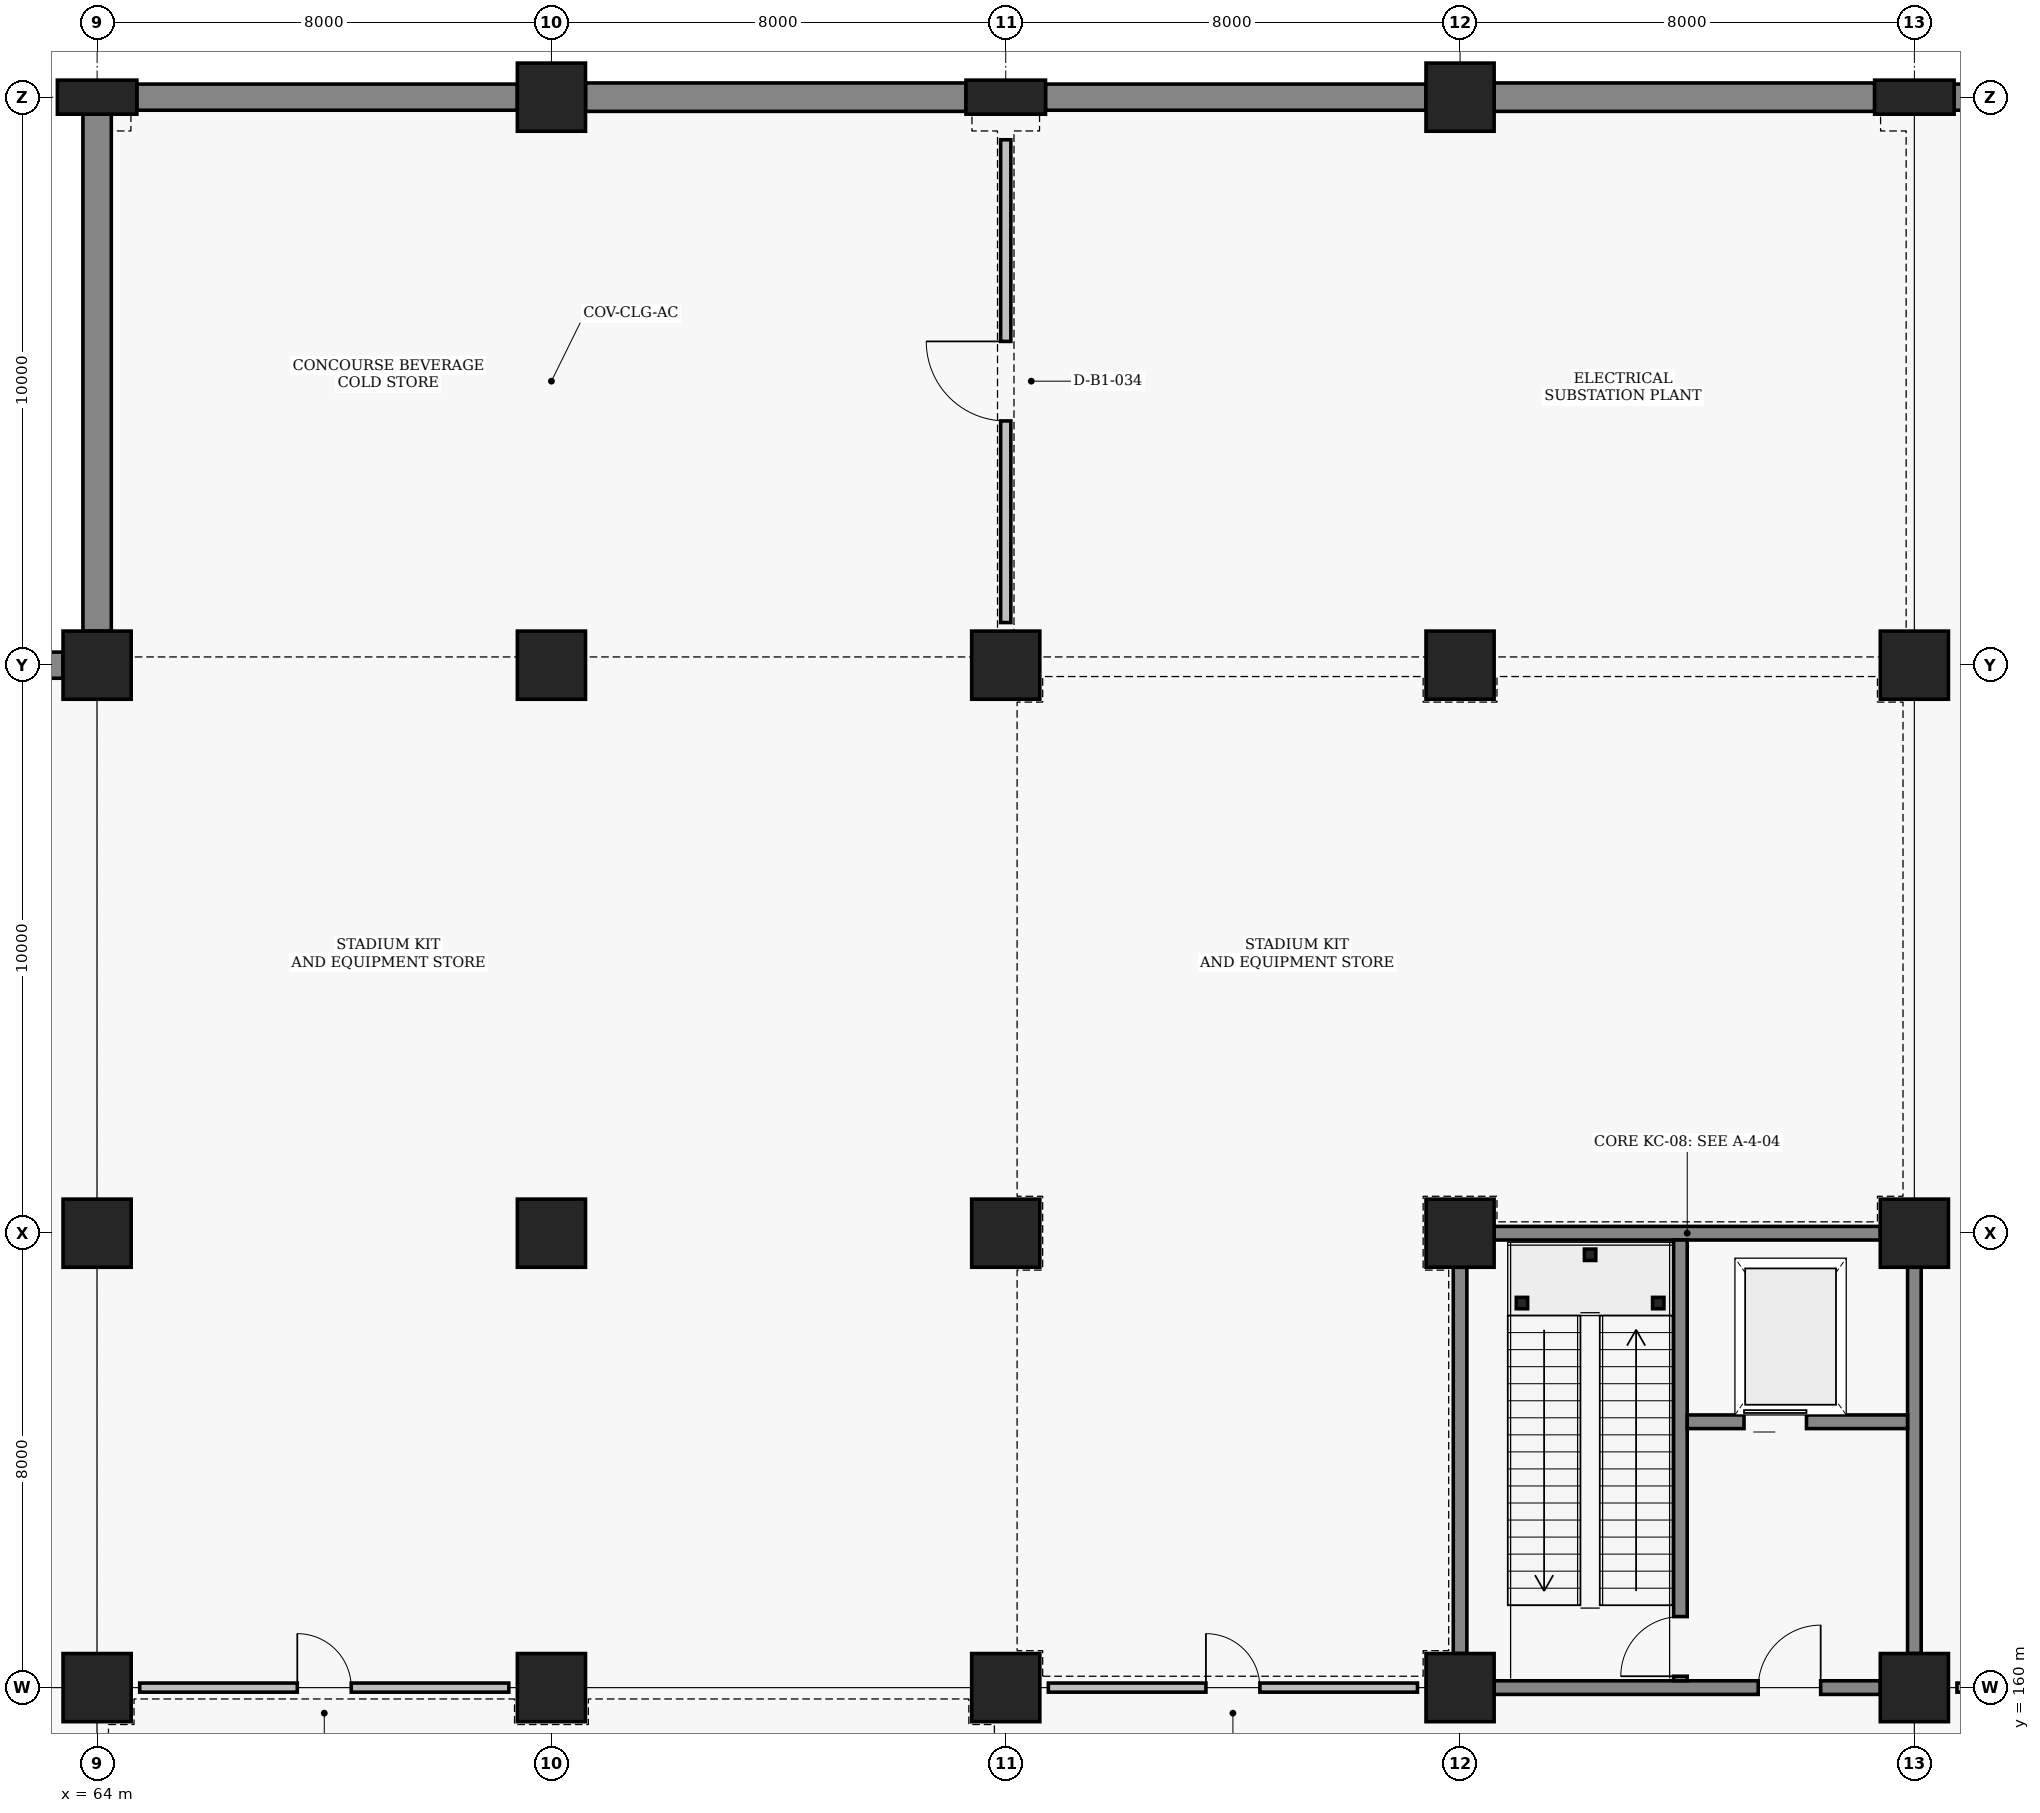
"""IFC4 building model, lengths in metres.
Left out: names, types, materials, properties, quantities, classifications, styles, units other than length and angle.
Written with IfcOpenShell. Run it as: python <this file> out.ifc"""

import sys

from ifc_helpers import new_model, si_unit, direction, frame, frame_2d, origin, origin_2d, place, context, subcontext, project, spatial, rectangle, hollow_rectangle, extrude, element, fill, save


model = new_model("IFC4")
c1 = context("Model", 3, precision=1e-05, world=origin(), true_north=direction((0.0, 1.0)))
c2 = subcontext(c1, "Body", "Model", "MODEL_VIEW")
j1 = project(units=[si_unit("LENGTHUNIT", "METRE"), si_unit("PLANEANGLEUNIT", "RADIAN")], contexts=[c1])
p1 = place(None, origin())
s1 = spatial("IfcSite", under=j1, at=p1, CompositionType="ELEMENT")
p2 = place(p1, origin())
s2 = spatial("IfcBuilding", under=s1, at=p2, CompositionType="ELEMENT")
p3 = place(p2, frame((0.0, 0.0, -5.4)))
s3 = spatial("IfcBuildingStorey", under=s2, at=p3, CompositionType="ELEMENT", Elevation=-5.4)
for number, where, z_axis, x_axis in (
    (1, (64.0, 160.0, 0.0), (0.0, 0.0, 1.0), (1.0, 0.0, 0.0)),
    (2, (64.0, 168.0, 0.0), (0.0, 0.0, 1.0), (1.0, 0.0, 0.0)),
    (3, (64.0, 178.0, 0.0), (0.0, 0.0, 1.0), (1.0, 0.0, 0.0)),
):
    element("IfcColumn", number, at=place(p3, frame(where, z_axis=z_axis, x_axis=x_axis)), inside=s3, PredefinedType="COLUMN", context=c2, shape_type="SweptSolid", body=[
        extrude(rectangle(XDim=1.2, YDim=1.2, at=origin_2d()), origin(), (0.0, 0.0, 1.0), 5.4),
    ])
p4 = place(p3, frame((64.0, 188.0, 0.0), z_axis=(0.0, 0.0, 1.0), x_axis=(0.0, 1.0, 0.0)))
e4 = element("IfcColumn", 4, at=p4, inside=s3, PredefinedType="PILASTER", context=c2, shape_type="SweptSolid", body=[
    extrude(rectangle(XDim=0.6, YDim=1.4, at=origin_2d()), origin(), (0.0, 0.0, 1.0), 5.4),
])
for number, where, z_axis, x_axis in (
    (5, (72.0, 160.0, 0.0), (0.0, 0.0, 1.0), (1.0, 0.0, 0.0)),
    (6, (72.0, 168.0, 0.0), (0.0, 0.0, 1.0), (1.0, 0.0, 0.0)),
    (7, (72.0, 178.0, 0.0), (0.0, 0.0, 1.0), (1.0, 0.0, 0.0)),
    (8, (72.0, 188.0, 0.0), (0.0, 0.0, 1.0), (1.0, 0.0, 0.0)),
    (9, (80.0, 160.0, 0.0), (0.0, 0.0, 1.0), (1.0, 0.0, 0.0)),
    (10, (80.0, 168.0, 0.0), (0.0, 0.0, 1.0), (1.0, 0.0, 0.0)),
    (11, (80.0, 178.0, 0.0), (0.0, 0.0, 1.0), (1.0, 0.0, 0.0)),
):
    element("IfcColumn", number, at=place(p3, frame(where, z_axis=z_axis, x_axis=x_axis)), inside=s3, PredefinedType="COLUMN", context=c2, shape_type="SweptSolid", body=[
        extrude(rectangle(XDim=1.2, YDim=1.2, at=origin_2d()), origin(), (0.0, 0.0, 1.0), 5.4),
    ])
p5 = place(p3, frame((80.0, 188.0, 0.0), z_axis=(0.0, 0.0, 1.0), x_axis=(0.0, 1.0, 0.0)))
e12 = element("IfcColumn", 12, at=p5, inside=s3, PredefinedType="PILASTER", context=c2, shape_type="SweptSolid", body=[
    extrude(rectangle(XDim=0.6, YDim=1.4, at=origin_2d()), origin(), (0.0, 0.0, 1.0), 5.4),
])
for number, where, z_axis, x_axis in (
    (13, (88.0, 160.0, 0.0), (0.0, 0.0, 1.0), (1.0, 0.0, 0.0)),
    (14, (88.0, 168.0, 0.0), (0.0, 0.0, 1.0), (1.0, 0.0, 0.0)),
    (15, (88.0, 178.0, 0.0), (0.0, 0.0, 1.0), (1.0, 0.0, 0.0)),
    (16, (88.0, 188.0, 0.0), (0.0, 0.0, 1.0), (1.0, 0.0, 0.0)),
    (17, (96.0, 160.0, 0.0), (0.0, 0.0, 1.0), (1.0, 0.0, 0.0)),
    (18, (96.0, 168.0, 0.0), (0.0, 0.0, 1.0), (1.0, 0.0, 0.0)),
    (19, (96.0, 178.0, 0.0), (0.0, 0.0, 1.0), (1.0, 0.0, 0.0)),
):
    element("IfcColumn", number, at=place(p3, frame(where, z_axis=z_axis, x_axis=x_axis)), inside=s3, PredefinedType="COLUMN", context=c2, shape_type="SweptSolid", body=[
        extrude(rectangle(XDim=1.2, YDim=1.2, at=origin_2d()), origin(), (0.0, 0.0, 1.0), 5.4),
    ])
p6 = place(p3, frame((96.0, 188.0, 0.0), z_axis=(0.0, 0.0, 1.0), x_axis=(0.0, 1.0, 0.0)))
e20 = element("IfcColumn", 20, at=p6, inside=s3, PredefinedType="PILASTER", context=c2, shape_type="SweptSolid", body=[
    extrude(rectangle(XDim=0.6, YDim=1.4, at=origin_2d()), origin(), (0.0, 0.0, 1.0), 5.4),
])
p7 = place(p3, frame((56.6, 178.0, 0.0), z_axis=(0.0, 0.0, 1.0), x_axis=(1.0, 0.0, 0.0)))
e21 = element("IfcWall", 21, at=p7, inside=s3, PredefinedType="STANDARD", context=c2, shape_type="SweptSolid", body=[
    extrude(rectangle(XDim=6.8, YDim=0.46, at=frame_2d((3.4, 0.0))), origin(), (0.0, 0.0, 1.0), 4.24),
])
p8 = place(p3, frame((64.7, 188.0, 0.0), z_axis=(0.0, 0.0, 1.0), x_axis=(1.0, 0.0, 0.0)))
e22 = element("IfcWall", 22, at=p8, inside=s3, PredefinedType="STANDARD", context=c2, shape_type="SweptSolid", body=[
    extrude(rectangle(XDim=6.7, YDim=0.46, at=frame_2d((3.35, 0.0))), origin(), (0.0, 0.0, 1.0), 4.34),
])
p9 = place(p3, frame((64.0, 178.6, 0.0), z_axis=(0.0, 0.0, 1.0), x_axis=(0.0, 1.0, 0.0)))
e23 = element("IfcWall", 23, at=p9, inside=s3, PredefinedType="STANDARD", context=c2, shape_type="SweptSolid", body=[
    extrude(rectangle(XDim=9.1, YDim=0.5, at=frame_2d((4.55, 0.0))), origin(), (0.0, 0.0, 1.0), 4.24),
])
p10 = place(p3, frame((72.6, 188.0, 0.0), z_axis=(0.0, 0.0, 1.0), x_axis=(1.0, 0.0, 0.0)))
e24 = element("IfcWall", 24, at=p10, inside=s3, PredefinedType="STANDARD", context=c2, shape_type="SweptSolid", body=[
    extrude(rectangle(XDim=6.7, YDim=0.5, at=frame_2d((3.35, 0.0))), origin(), (0.0, 0.0, 1.0), 4.34),
])
p11 = place(p3, frame((80.7, 188.0, 0.0), z_axis=(0.0, 0.0, 1.0), x_axis=(1.0, 0.0, 0.0)))
e25 = element("IfcWall", 25, at=p11, inside=s3, PredefinedType="STANDARD", context=c2, shape_type="SweptSolid", body=[
    extrude(rectangle(XDim=6.7, YDim=0.46, at=frame_2d((3.35, 0.0))), origin(), (0.0, 0.0, 1.0), 4.34),
])
p12 = place(p3, frame((88.6, 188.0, 0.0), z_axis=(0.0, 0.0, 1.0), x_axis=(1.0, 0.0, 0.0)))
e26 = element("IfcWall", 26, at=p12, inside=s3, PredefinedType="STANDARD", context=c2, shape_type="SweptSolid", body=[
    extrude(rectangle(XDim=6.7, YDim=0.5, at=frame_2d((3.35, 0.0))), origin(), (0.0, 0.0, 1.0), 4.34),
])
p13 = place(p3, frame((96.7, 188.0, 0.0), z_axis=(0.0, 0.0, 1.0), x_axis=(1.0, 0.0, 0.0)))
e27 = element("IfcWall", 27, at=p13, inside=s3, PredefinedType="STANDARD", context=c2, shape_type="SweptSolid", body=[
    extrude(rectangle(XDim=6.7, YDim=0.46, at=frame_2d((3.35, 0.0))), origin(), (0.0, 0.0, 1.0), 4.34),
])
p14 = place(p3, frame((88.6, 160.0, 0.0), z_axis=(0.0, 0.0, 1.0), x_axis=(1.0, 0.0, 0.0)))
e28 = element("IfcWall", 28, at=p14, inside=s3, PredefinedType="SHEAR", context=c2, shape_type="SweptSolid", body=[
    extrude(rectangle(XDim=6.8, YDim=0.24, at=frame_2d((3.4, 0.0))), origin(), (0.0, 0.0, 1.0), 4.59),
])
p15 = place(p14, frame((4.65, 0.0, 0.0)))
e29 = element("IfcOpeningElement", 29, at=p15, cuts=e28, PredefinedType="OPENING", context=c2, shape_type="SweptSolid", body=[
    extrude(rectangle(XDim=1.1, YDim=2.2, at=frame_2d((0.55, 1.1))), frame((0.0, 0.13, 0.0), z_axis=(0.0, -1.0, 0.0), x_axis=(1.0, 0.0, 0.0)), (0.0, 0.0, 1.0), 0.26),
])
p16 = place(p3, frame((88.6, 168.0, 0.0), z_axis=(0.0, 0.0, 1.0), x_axis=(1.0, 0.0, 0.0)))
e30 = element("IfcWall", 30, at=p16, inside=s3, PredefinedType="SHEAR", context=c2, shape_type="SweptSolid", body=[
    extrude(rectangle(XDim=6.8, YDim=0.24, at=frame_2d((3.4, 0.0))), origin(), (0.0, 0.0, 1.0), 4.59),
])
for number, where, z_axis, x_axis in (
    (31, (88.0, 160.6, 0.0), (0.0, 0.0, 1.0), (0.0, 1.0, 0.0)),
    (32, (96.0, 160.6, 0.0), (0.0, 0.0, 1.0), (0.0, 1.0, 0.0)),
):
    element("IfcWall", number, at=place(p3, frame(where, z_axis=z_axis, x_axis=x_axis)), inside=s3, PredefinedType="SHEAR", context=c2, shape_type="SweptSolid", body=[
        extrude(rectangle(XDim=6.8, YDim=0.24, at=frame_2d((3.4, 0.0))), origin(), (0.0, 0.0, 1.0), 4.39),
    ])
p17 = place(p3, frame((91.88, 160.12, 0.0), z_axis=(0.0, 0.0, 1.0), x_axis=(0.0, 1.0, 0.0)))
e33 = element("IfcWall", 33, at=p17, inside=s3, PredefinedType="SHEAR", context=c2, shape_type="SweptSolid", body=[
    extrude(rectangle(XDim=7.76, YDim=0.24, at=frame_2d((3.88, 0.0))), origin(), (0.0, 0.0, 1.0), 4.59),
])
p18 = place(p17, frame((0.08, 0.0, 0.0)))
e34 = element("IfcOpeningElement", 34, at=p18, cuts=e33, PredefinedType="OPENING", context=c2, shape_type="SweptSolid", body=[
    extrude(rectangle(XDim=1.05, YDim=2.15, at=frame_2d((0.525, 1.075))), frame((0.0, 0.13, 0.0), z_axis=(0.0, -1.0, 0.0), x_axis=(1.0, 0.0, 0.0)), (0.0, 0.0, 1.0), 0.26),
])
p19 = place(p3, frame((92.0, 164.68, 0.0), z_axis=(0.0, 0.0, 1.0), x_axis=(1.0, 0.0, 0.0)))
e35 = element("IfcWall", 35, at=p19, inside=s3, PredefinedType="SHEAR", context=c2, shape_type="SweptSolid", body=[
    extrude(rectangle(XDim=3.88, YDim=0.24, at=frame_2d((1.94, 0.0))), origin(), (0.0, 0.0, 1.0), 4.39),
])
p20 = place(p19, frame((1.0, 0.0, 0.0)))
e36 = element("IfcOpeningElement", 36, at=p20, cuts=e35, PredefinedType="OPENING", context=c2, shape_type="SweptSolid", body=[
    extrude(rectangle(XDim=1.1, YDim=2.15, at=frame_2d((0.55, 1.075))), frame((0.0, 0.13, 0.0), z_axis=(0.0, -1.0, 0.0), x_axis=(1.0, 0.0, 0.0)), (0.0, 0.0, 1.0), 0.26),
])
for number, where, z_axis, x_axis in (
    (37, (89.09, 166.77, 0.0), (0.0, 0.0, 1.0), (1.0, 0.0, 0.0)),
    (38, (91.49, 166.77, 0.0), (0.0, 0.0, 1.0), (1.0, 0.0, 0.0)),
    (39, (90.29, 167.62, 0.0), (0.0, 0.0, 1.0), (1.0, 0.0, 0.0)),
):
    element("IfcColumn", number, at=place(p3, frame(where, z_axis=z_axis, x_axis=x_axis)), inside=s3, PredefinedType="COLUMN", context=c2, shape_type="SweptSolid", body=[
        extrude(hollow_rectangle(XDim=0.2, YDim=0.2, WallThickness=0.009, at=origin_2d()), origin(), (0.0, 0.0, 1.0), 2.5),
    ])
p21 = place(p3, frame((64.75, 160.0, 0.0), z_axis=(0.0, 0.0, 1.0), x_axis=(1.0, 0.0, 0.0)))
e40 = element("IfcWall", 40, at=p21, inside=s3, PredefinedType="PARTITIONING", context=c2, shape_type="SweptSolid", body=[
    extrude(rectangle(XDim=6.5, YDim=0.16, at=frame_2d((3.25, 0.0))), origin(), (0.0, 0.0, 1.0), 3.69),
])
p22 = place(p21, frame((2.775, 0.0, 0.0)))
e41 = element("IfcOpeningElement", 41, at=p22, cuts=e40, PredefinedType="OPENING", context=c2, shape_type="SweptSolid", body=[
    extrude(rectangle(XDim=0.95, YDim=2.1, at=frame_2d((0.475, 1.05))), frame((0.0, 0.09, 0.0), z_axis=(0.0, -1.0, 0.0), x_axis=(1.0, 0.0, 0.0)), (0.0, 0.0, 1.0), 0.18),
])
p23 = place(p3, frame((80.75, 160.0, 0.0), z_axis=(0.0, 0.0, 1.0), x_axis=(1.0, 0.0, 0.0)))
e42 = element("IfcWall", 42, at=p23, inside=s3, PredefinedType="PARTITIONING", context=c2, shape_type="SweptSolid", body=[
    extrude(rectangle(XDim=6.5, YDim=0.16, at=frame_2d((3.25, 0.0))), origin(), (0.0, 0.0, 1.0), 4.49),
])
p24 = place(p23, frame((2.775, 0.0, 0.0)))
e43 = element("IfcOpeningElement", 43, at=p24, cuts=e42, PredefinedType="OPENING", context=c2, shape_type="SweptSolid", body=[
    extrude(rectangle(XDim=0.95, YDim=2.1, at=frame_2d((0.475, 1.05))), frame((0.0, 0.09, 0.0), z_axis=(0.0, -1.0, 0.0), x_axis=(1.0, 0.0, 0.0)), (0.0, 0.0, 1.0), 0.18),
])
p25 = place(p3, frame((80.0, 178.75, 0.0), z_axis=(0.0, 0.0, 1.0), x_axis=(0.0, 1.0, 0.0)))
e44 = element("IfcWall", 44, at=p25, inside=s3, PredefinedType="PARTITIONING", context=c2, shape_type="SweptSolid", body=[
    extrude(rectangle(XDim=8.5, YDim=0.18, at=frame_2d((4.25, 0.0))), origin(), (0.0, 0.0, 1.0), 4.29),
])
p26 = place(p25, frame((3.55, 0.0, 0.0)))
e45 = element("IfcOpeningElement", 45, at=p26, cuts=e44, PredefinedType="OPENING", context=c2, shape_type="SweptSolid", body=[
    extrude(rectangle(XDim=1.4, YDim=2.2, at=frame_2d((0.7, 1.1))), frame((0.0, 0.1, 0.0), z_axis=(0.0, -1.0, 0.0), x_axis=(1.0, 0.0, 0.0)), (0.0, 0.0, 1.0), 0.2),
])
p27 = place(p3, frame((96.75, 160.0, 0.0), z_axis=(0.0, 0.0, 1.0), x_axis=(1.0, 0.0, 0.0)))
e46 = element("IfcWall", 46, at=p27, inside=s3, PredefinedType="PARTITIONING", context=c2, shape_type="SweptSolid", body=[
    extrude(rectangle(XDim=6.5, YDim=0.16, at=frame_2d((3.25, 0.0))), origin(), (0.0, 0.0, 1.0), 4.49),
])
p28 = place(p27, frame((2.775, 0.0, 0.0)))
e47 = element("IfcOpeningElement", 47, at=p28, cuts=e46, PredefinedType="OPENING", context=c2, shape_type="SweptSolid", body=[
    extrude(rectangle(XDim=0.95, YDim=2.1, at=frame_2d((0.475, 1.05))), frame((0.0, 0.09, 0.0), z_axis=(0.0, -1.0, 0.0), x_axis=(1.0, 0.0, 0.0)), (0.0, 0.0, 1.0), 0.18),
])
p29 = place(p15, origin())
e48 = element("IfcDoor", 48, at=p29, inside=s3, OperationType="SINGLE_SWING_RIGHT", PredefinedType="DOOR", context=c2, shape_type="SweptSolid", body=[
    extrude(rectangle(XDim=1.1, YDim=2.2, at=frame_2d((0.55, 1.1))), frame((0.0, 0.025, 0.0), z_axis=(0.0, -1.0, 0.0), x_axis=(1.0, 0.0, 0.0)), (0.0, 0.0, 1.0), 0.05),
])
fill(e29, e48)
p30 = place(p18, origin())
e49 = element("IfcDoor", 49, at=p30, inside=s3, OperationType="SINGLE_SWING_LEFT", PredefinedType="DOOR", context=c2, shape_type="SweptSolid", body=[
    extrude(rectangle(XDim=1.05, YDim=2.15, at=frame_2d((0.525, 1.075))), frame((0.0, 0.025, 0.0), z_axis=(0.0, -1.0, 0.0), x_axis=(1.0, 0.0, 0.0)), (0.0, 0.0, 1.0), 0.05),
])
fill(e34, e49)
p31 = place(p20, origin())
e50 = element("IfcDoor", 50, at=p31, inside=s3, OperationType="SLIDING_TO_LEFT", PredefinedType="DOOR", context=c2, shape_type="SweptSolid", body=[
    extrude(rectangle(XDim=1.1, YDim=2.15, at=frame_2d((0.55, 1.075))), frame((0.0, 0.025, 0.0), z_axis=(0.0, -1.0, 0.0), x_axis=(1.0, 0.0, 0.0)), (0.0, 0.0, 1.0), 0.05),
])
fill(e36, e50)
p32 = place(p22, origin())
e51 = element("IfcDoor", 51, at=p32, inside=s3, OperationType="SINGLE_SWING_LEFT", PredefinedType="DOOR", context=c2, shape_type="SweptSolid", body=[
    extrude(rectangle(XDim=0.95, YDim=2.1, at=frame_2d((0.475, 1.05))), frame((0.0, 0.025, 0.0), z_axis=(0.0, -1.0, 0.0), x_axis=(1.0, 0.0, 0.0)), (0.0, 0.0, 1.0), 0.05),
])
fill(e41, e51)
p33 = place(p24, origin())
e52 = element("IfcDoor", 52, at=p33, inside=s3, OperationType="SINGLE_SWING_LEFT", PredefinedType="DOOR", context=c2, shape_type="SweptSolid", body=[
    extrude(rectangle(XDim=0.95, YDim=2.1, at=frame_2d((0.475, 1.05))), frame((0.0, 0.025, 0.0), z_axis=(0.0, -1.0, 0.0), x_axis=(1.0, 0.0, 0.0)), (0.0, 0.0, 1.0), 0.05),
])
fill(e43, e52)
p34 = place(p26, origin())
e53 = element("IfcDoor", 53, at=p34, inside=s3, OperationType="SINGLE_SWING_RIGHT", PredefinedType="DOOR", context=c2, shape_type="SweptSolid", body=[
    extrude(rectangle(XDim=1.4, YDim=2.2, at=frame_2d((0.7, 1.1))), frame((0.0, 0.025, 0.0), z_axis=(0.0, -1.0, 0.0), x_axis=(1.0, 0.0, 0.0)), (0.0, 0.0, 1.0), 0.05),
])
fill(e45, e53)
save(model, sys.argv[1])
